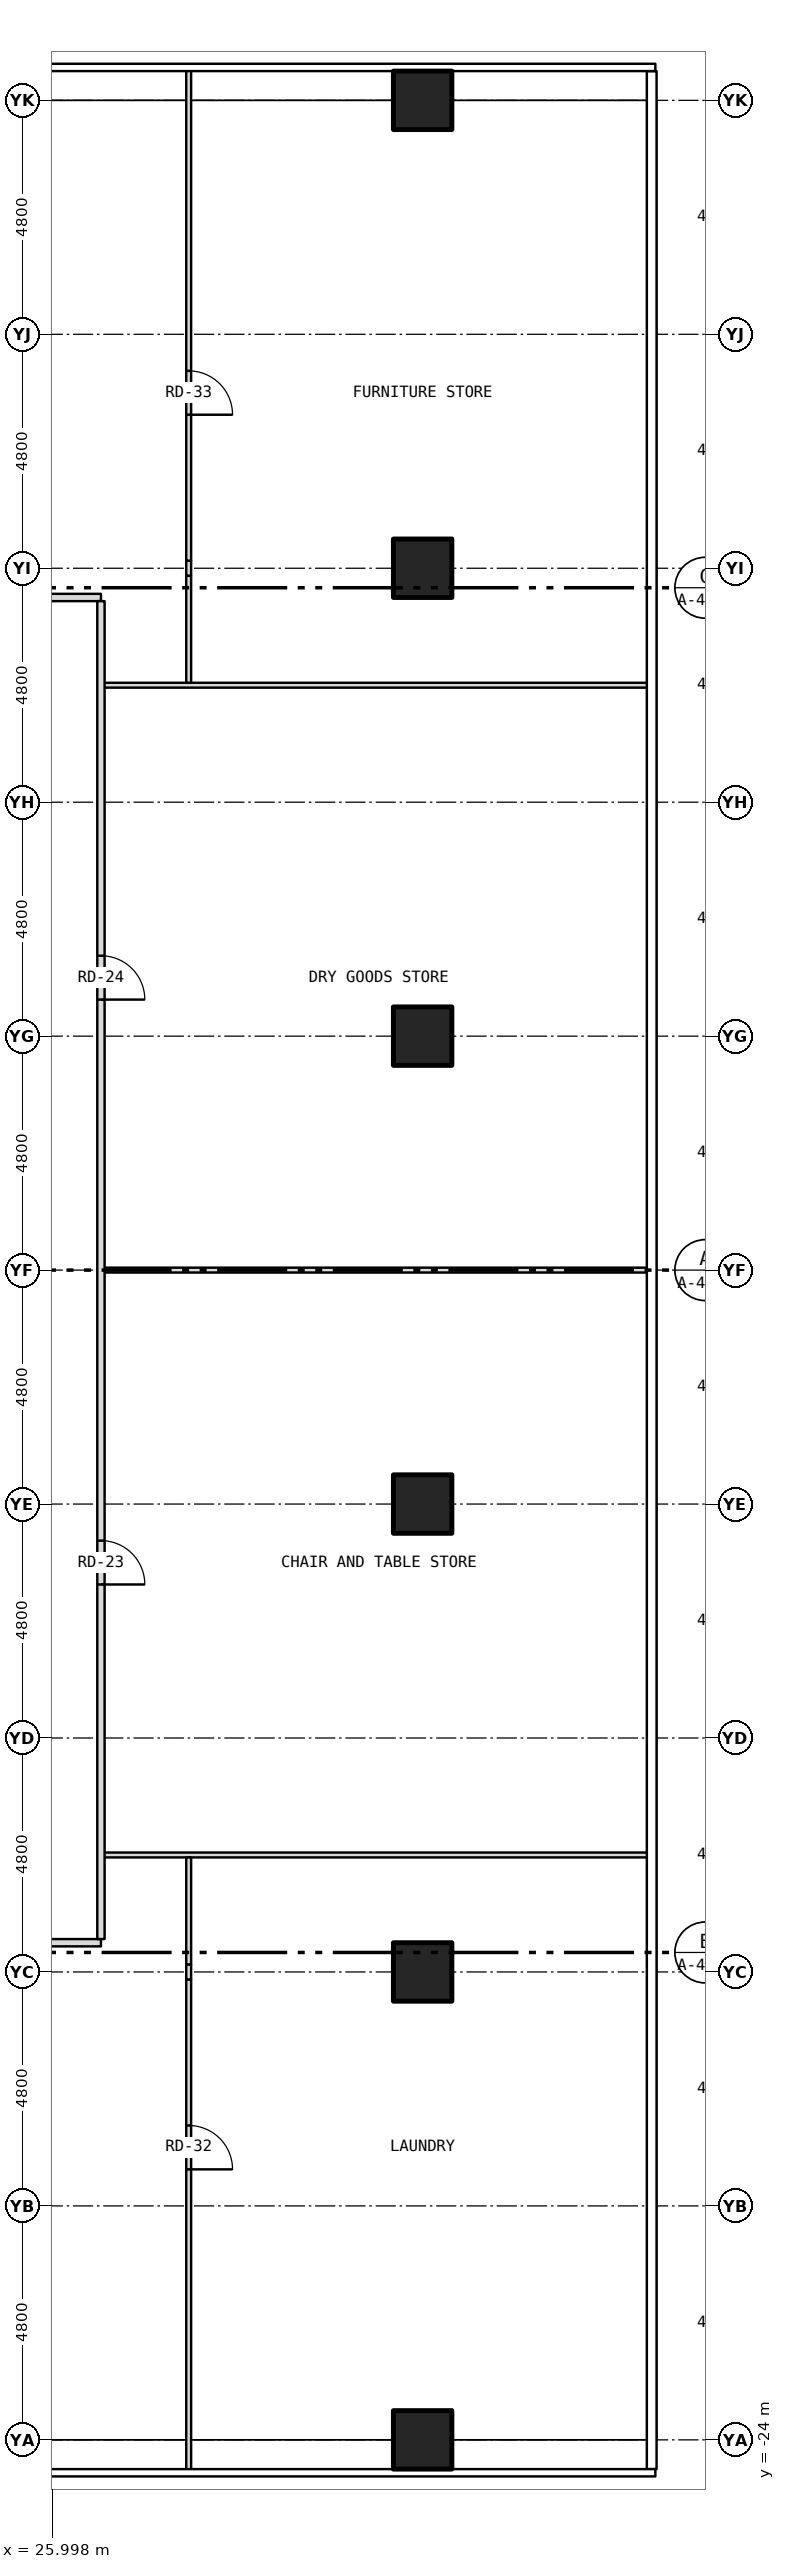
"""IFC4 building model, lengths in metres.
Left out: names, types, materials, properties, quantities, classifications, styles, units other than length and angle.
Written with IfcOpenShell. Run it as: python <this file> out.ifc"""

import sys

from ifc_helpers import new_model, si_unit, direction, frame, frame_2d, origin, origin_2d, place, context, subcontext, project, spatial, rectangle, hollow_rectangle, extrude, element, fill, save


model = new_model("IFC4")
c1 = context("Model", 3, precision=1e-05, world=origin(), true_north=direction((0.0, 1.0)))
c2 = subcontext(c1, "Body", "Model", "MODEL_VIEW")
j1 = project(units=[si_unit("LENGTHUNIT", "METRE"), si_unit("PLANEANGLEUNIT", "RADIAN")], contexts=[c1])
p1 = place(None, origin())
s1 = spatial("IfcSite", under=j1, at=p1, CompositionType="ELEMENT")
p2 = place(p1, origin())
s2 = spatial("IfcBuilding", under=s1, at=p2, CompositionType="ELEMENT")
p3 = place(p2, frame((0.0, 0.0, 7.5)))
s3 = spatial("IfcBuildingStorey", under=s2, at=p3, CompositionType="ELEMENT", Elevation=7.5)
for number, where, z_axis, x_axis in (
    (1, (33.6, -24.0, -0.25), (0.0, 0.0, 1.0), (1.0, 0.0, 0.0)),
    (2, (33.6, -14.4, -0.25), (0.0, 0.0, 1.0), (1.0, 0.0, 0.0)),
    (3, (33.6, -4.8, -0.25), (0.0, 0.0, 1.0), (1.0, 0.0, 0.0)),
    (4, (33.6, 4.8, -0.25), (0.0, 0.0, 1.0), (1.0, 0.0, 0.0)),
    (5, (33.6, 14.4, -0.25), (0.0, 0.0, 1.0), (1.0, 0.0, 0.0)),
    (6, (33.6, 24.0, -0.25), (0.0, 0.0, 1.0), (1.0, 0.0, 0.0)),
):
    element("IfcColumn", number, at=place(p3, frame(where, z_axis=z_axis, x_axis=x_axis)), inside=s3, PredefinedType="COLUMN", context=c2, shape_type="SweptSolid", body=[
        extrude(hollow_rectangle(XDim=1.2, YDim=1.2, WallThickness=0.07, at=origin_2d()), origin(), (0.0, 0.0, 1.0), 8.05),
    ])
p4 = place(p3, frame((-27.0, -13.8, 0.0), z_axis=(0.0, 0.0, 1.0), x_axis=(1.0, 0.0, 0.0)))
e7 = element("IfcWall", 7, at=p4, inside=s3, PredefinedType="PARTITIONING", context=c2, shape_type="SweptSolid", body=[
    extrude(rectangle(XDim=54.0, YDim=0.15, at=frame_2d((27.0, 0.0))), origin(), (0.0, 0.0, 1.0), 7.8),
])
p5 = place(p4, frame((9.03, 0.0, 0.0)))
e8 = element("IfcOpeningElement", 8, at=p5, cuts=e7, PredefinedType="OPENING", context=c2, shape_type="SweptSolid", body=[
    extrude(rectangle(XDim=0.9, YDim=2.1, at=frame_2d((0.45, 1.05))), frame((0.0, 0.087, 0.0), z_axis=(0.0, -1.0, 0.0), x_axis=(1.0, 0.0, 0.0)), (0.0, 0.0, 1.0), 0.174),
])
p6 = place(p4, frame((11.08, 0.0, 0.0)))
e9 = element("IfcOpeningElement", 9, at=p6, cuts=e7, PredefinedType="OPENING", context=c2, shape_type="SweptSolid", body=[
    extrude(rectangle(XDim=0.9, YDim=2.1, at=frame_2d((0.45, 1.05))), frame((0.0, 0.087, 0.0), z_axis=(0.0, -1.0, 0.0), x_axis=(1.0, 0.0, 0.0)), (0.0, 0.0, 1.0), 0.174),
])
p7 = place(p4, frame((19.891, 0.0, 0.0)))
e10 = element("IfcOpeningElement", 10, at=p7, cuts=e7, PredefinedType="OPENING", context=c2, shape_type="SweptSolid", body=[
    extrude(rectangle(XDim=0.9, YDim=2.1, at=frame_2d((0.45, 1.05))), frame((0.0, 0.087, 0.0), z_axis=(0.0, -1.0, 0.0), x_axis=(1.0, 0.0, 0.0)), (0.0, 0.0, 1.0), 0.174),
])
p8 = place(p4, frame((30.274, 0.0, 0.0)))
e11 = element("IfcOpeningElement", 11, at=p8, cuts=e7, PredefinedType="OPENING", context=c2, shape_type="SweptSolid", body=[
    extrude(rectangle(XDim=0.9, YDim=2.1, at=frame_2d((0.45, 1.05))), frame((0.0, 0.087, 0.0), z_axis=(0.0, -1.0, 0.0), x_axis=(1.0, 0.0, 0.0)), (0.0, 0.0, 1.0), 0.174),
])
p9 = place(p4, frame((3.75, 0.0, 0.0)))
e12 = element("IfcOpeningElement", 12, at=p9, cuts=e7, PredefinedType="OPENING", context=c2, shape_type="SweptSolid", body=[
    extrude(rectangle(XDim=0.9, YDim=2.1, at=frame_2d((0.45, 1.05))), frame((0.0, 0.087, 0.0), z_axis=(0.0, -1.0, 0.0), x_axis=(1.0, 0.0, 0.0)), (0.0, 0.0, 1.0), 0.174),
])
p10 = place(p4, frame((49.35, 0.0, 0.0)))
e13 = element("IfcOpeningElement", 13, at=p10, cuts=e7, PredefinedType="OPENING", context=c2, shape_type="SweptSolid", body=[
    extrude(rectangle(XDim=0.9, YDim=2.1, at=frame_2d((0.45, 1.05))), frame((0.0, 0.087, 0.0), z_axis=(0.0, -1.0, 0.0), x_axis=(1.0, 0.0, 0.0)), (0.0, 0.0, 1.0), 0.174),
])
p11 = place(p4, frame((42.15, 0.0, 0.0)))
e14 = element("IfcOpeningElement", 14, at=p11, cuts=e7, PredefinedType="OPENING", context=c2, shape_type="SweptSolid", body=[
    extrude(rectangle(XDim=0.9, YDim=2.1, at=frame_2d((0.45, 1.05))), frame((0.0, 0.087, 0.0), z_axis=(0.0, -1.0, 0.0), x_axis=(1.0, 0.0, 0.0)), (0.0, 0.0, 1.0), 0.174),
])
p12 = place(p4, frame((15.239, 0.0, 0.0)))
e15 = element("IfcOpeningElement", 15, at=p12, cuts=e7, PredefinedType="OPENING", context=c2, shape_type="SweptSolid", body=[
    extrude(rectangle(XDim=0.9, YDim=2.1, at=frame_2d((0.45, 1.05))), frame((0.0, 0.087, 0.0), z_axis=(0.0, -1.0, 0.0), x_axis=(1.0, 0.0, 0.0)), (0.0, 0.0, 1.0), 0.174),
])
for number, where, z_axis, x_axis in (
    (16, (27.0, -12.0, 0.0), (0.0, 0.0, 1.0), (1.0, 0.0, 0.0)),
    (17, (27.0, 0.0, 0.0), (0.0, 0.0, 1.0), (1.0, 0.0, 0.0)),
    (18, (27.0, 12.0, 0.0), (0.0, 0.0, 1.0), (1.0, 0.0, 0.0)),
):
    element("IfcWall", number, at=place(p3, frame(where, z_axis=z_axis, x_axis=x_axis)), inside=s3, PredefinedType="PARTITIONING", context=c2, shape_type="SweptSolid", body=[
        extrude(rectangle(XDim=11.28, YDim=0.1, at=frame_2d((5.64, 0.0))), origin(), (0.0, 0.0, 1.0), 7.8),
    ])
p13 = place(p3, frame((-27.0, 13.8, 0.0), z_axis=(0.0, 0.0, 1.0), x_axis=(1.0, 0.0, 0.0)))
e19 = element("IfcWall", 19, at=p13, inside=s3, PredefinedType="PARTITIONING", context=c2, shape_type="SweptSolid", body=[
    extrude(rectangle(XDim=54.0, YDim=0.15, at=frame_2d((27.0, 0.0))), origin(), (0.0, 0.0, 1.0), 7.8),
])
p14 = place(p13, frame((13.35, 0.0, 0.0)))
e20 = element("IfcOpeningElement", 20, at=p14, cuts=e19, PredefinedType="OPENING", context=c2, shape_type="SweptSolid", body=[
    extrude(rectangle(XDim=0.9, YDim=2.1, at=frame_2d((0.45, 1.05))), frame((0.0, 0.087, 0.0), z_axis=(0.0, -1.0, 0.0), x_axis=(1.0, 0.0, 0.0)), (0.0, 0.0, 1.0), 0.174),
])
p15 = place(p13, frame((22.846, 0.0, 0.0)))
e21 = element("IfcOpeningElement", 21, at=p15, cuts=e19, PredefinedType="OPENING", context=c2, shape_type="SweptSolid", body=[
    extrude(rectangle(XDim=0.9, YDim=2.1, at=frame_2d((0.45, 1.05))), frame((0.0, 0.087, 0.0), z_axis=(0.0, -1.0, 0.0), x_axis=(1.0, 0.0, 0.0)), (0.0, 0.0, 1.0), 0.174),
])
p16 = place(p13, frame((28.756, 0.0, 0.0)))
e22 = element("IfcOpeningElement", 22, at=p16, cuts=e19, PredefinedType="OPENING", context=c2, shape_type="SweptSolid", body=[
    extrude(rectangle(XDim=0.9, YDim=2.1, at=frame_2d((0.45, 1.05))), frame((0.0, 0.087, 0.0), z_axis=(0.0, -1.0, 0.0), x_axis=(1.0, 0.0, 0.0)), (0.0, 0.0, 1.0), 0.174),
])
p17 = place(p13, frame((33.556, 0.0, 0.0)))
e23 = element("IfcOpeningElement", 23, at=p17, cuts=e19, PredefinedType="OPENING", context=c2, shape_type="SweptSolid", body=[
    extrude(rectangle(XDim=0.9, YDim=2.1, at=frame_2d((0.45, 1.05))), frame((0.0, 0.087, 0.0), z_axis=(0.0, -1.0, 0.0), x_axis=(1.0, 0.0, 0.0)), (0.0, 0.0, 1.0), 0.174),
])
p18 = place(p13, frame((42.768, 0.0, 0.0)))
e24 = element("IfcOpeningElement", 24, at=p18, cuts=e19, PredefinedType="OPENING", context=c2, shape_type="SweptSolid", body=[
    extrude(rectangle(XDim=0.9, YDim=2.1, at=frame_2d((0.45, 1.05))), frame((0.0, 0.087, 0.0), z_axis=(0.0, -1.0, 0.0), x_axis=(1.0, 0.0, 0.0)), (0.0, 0.0, 1.0), 0.174),
])
p19 = place(p13, frame((3.75, 0.0, 0.0)))
e25 = element("IfcOpeningElement", 25, at=p19, cuts=e19, PredefinedType="OPENING", context=c2, shape_type="SweptSolid", body=[
    extrude(rectangle(XDim=0.9, YDim=2.1, at=frame_2d((0.45, 1.05))), frame((0.0, 0.087, 0.0), z_axis=(0.0, -1.0, 0.0), x_axis=(1.0, 0.0, 0.0)), (0.0, 0.0, 1.0), 0.174),
])
p20 = place(p13, frame((49.35, 0.0, 0.0)))
e26 = element("IfcOpeningElement", 26, at=p20, cuts=e19, PredefinedType="OPENING", context=c2, shape_type="SweptSolid", body=[
    extrude(rectangle(XDim=0.9, YDim=2.1, at=frame_2d((0.45, 1.05))), frame((0.0, 0.087, 0.0), z_axis=(0.0, -1.0, 0.0), x_axis=(1.0, 0.0, 0.0)), (0.0, 0.0, 1.0), 0.174),
])
p21 = place(p13, frame((25.283, 0.0, 0.0)))
e27 = element("IfcOpeningElement", 27, at=p21, cuts=e19, PredefinedType="OPENING", context=c2, shape_type="SweptSolid", body=[
    extrude(rectangle(XDim=0.9, YDim=2.1, at=frame_2d((0.45, 1.05))), frame((0.0, 0.087, 0.0), z_axis=(0.0, -1.0, 0.0), x_axis=(1.0, 0.0, 0.0)), (0.0, 0.0, 1.0), 0.174),
])
p22 = place(p3, frame((27.0, -13.725, 0.0), z_axis=(0.0, 0.0, 1.0), x_axis=(0.0, 1.0, 0.0)))
e28 = element("IfcWall", 28, at=p22, inside=s3, PredefinedType="PARTITIONING", context=c2, shape_type="SweptSolid", body=[
    extrude(rectangle(XDim=27.45, YDim=0.15, at=frame_2d((13.725, 0.0))), origin(), (0.0, 0.0, 1.0), 7.8),
])
p23 = place(p22, frame((7.275, 0.0, 0.0)))
e29 = element("IfcOpeningElement", 29, at=p23, cuts=e28, PredefinedType="OPENING", context=c2, shape_type="SweptSolid", body=[
    extrude(rectangle(XDim=0.9, YDim=2.1, at=frame_2d((0.45, 1.05))), frame((0.0, 0.087, 0.0), z_axis=(0.0, -1.0, 0.0), x_axis=(1.0, 0.0, 0.0)), (0.0, 0.0, 1.0), 0.174),
])
p24 = place(p22, frame((19.275, 0.0, 0.0)))
e30 = element("IfcOpeningElement", 30, at=p24, cuts=e28, PredefinedType="OPENING", context=c2, shape_type="SweptSolid", body=[
    extrude(rectangle(XDim=0.9, YDim=2.1, at=frame_2d((0.45, 1.05))), frame((0.0, 0.087, 0.0), z_axis=(0.0, -1.0, 0.0), x_axis=(1.0, 0.0, 0.0)), (0.0, 0.0, 1.0), 0.174),
])
p25 = place(p3, frame((28.8, -24.63, 0.0), z_axis=(0.0, 0.0, 1.0), x_axis=(0.0, 1.0, 0.0)))
e31 = element("IfcWall", 31, at=p25, inside=s3, PredefinedType="PARTITIONING", context=c2, shape_type="SweptSolid", body=[
    extrude(rectangle(XDim=10.076, YDim=0.1, at=frame_2d((5.038, 0.0))), origin(), (0.0, 0.0, 1.0), 7.183),
])
p26 = place(p25, frame((6.18, 0.0, 0.0)))
e32 = element("IfcOpeningElement", 32, at=p26, cuts=e31, PredefinedType="OPENING", context=c2, shape_type="SweptSolid", body=[
    extrude(rectangle(XDim=0.9, YDim=2.1, at=frame_2d((0.45, 1.05))), frame((0.0, 0.062, 0.0), z_axis=(0.0, -1.0, 0.0), x_axis=(1.0, 0.0, 0.0)), (0.0, 0.0, 1.0), 0.124),
])
p27 = place(p3, frame((28.8, -14.554, 0.0), z_axis=(0.0, 0.0, 1.0), x_axis=(0.0, 1.0, 0.0)))
e33 = element("IfcWall", 33, at=p27, inside=s3, PredefinedType="PARTITIONING", context=c2, shape_type="SweptSolid", body=[
    extrude(rectangle(XDim=0.308, YDim=0.1, at=frame_2d((0.154, 0.0))), origin(), (0.0, 0.0, 1.0), 7.8),
])
for number, where, z_axis, x_axis in (
    (34, (28.8, -14.246, 0.0), (0.0, 0.0, 1.0), (0.0, 1.0, 0.0)),
    (35, (28.8, 12.05, 0.0), (0.0, 0.0, 1.0), (0.0, 1.0, 0.0)),
):
    element("IfcWall", number, at=place(p3, frame(where, z_axis=z_axis, x_axis=x_axis)), inside=s3, PredefinedType="PARTITIONING", context=c2, shape_type="SweptSolid", body=[
        extrude(rectangle(XDim=2.196, YDim=0.1, at=frame_2d((1.098, 0.0))), origin(), (0.0, 0.0, 1.0), 7.183),
    ])
p28 = place(p3, frame((28.8, 14.246, 0.0), z_axis=(0.0, 0.0, 1.0), x_axis=(0.0, 1.0, 0.0)))
e36 = element("IfcWall", 36, at=p28, inside=s3, PredefinedType="PARTITIONING", context=c2, shape_type="SweptSolid", body=[
    extrude(rectangle(XDim=0.308, YDim=0.1, at=frame_2d((0.154, 0.0))), origin(), (0.0, 0.0, 1.0), 7.8),
])
p29 = place(p3, frame((28.8, 14.554, 0.0), z_axis=(0.0, 0.0, 1.0), x_axis=(0.0, 1.0, 0.0)))
e37 = element("IfcWall", 37, at=p29, inside=s3, PredefinedType="PARTITIONING", context=c2, shape_type="SweptSolid", body=[
    extrude(rectangle(XDim=10.076, YDim=0.1, at=frame_2d((5.038, 0.0))), origin(), (0.0, 0.0, 1.0), 7.183),
])
p30 = place(p29, frame((2.996, 0.0, 0.0)))
e38 = element("IfcOpeningElement", 38, at=p30, cuts=e37, PredefinedType="OPENING", context=c2, shape_type="SweptSolid", body=[
    extrude(rectangle(XDim=0.9, YDim=2.1, at=frame_2d((0.45, 1.05))), frame((0.0, 0.062, 0.0), z_axis=(0.0, -1.0, 0.0), x_axis=(1.0, 0.0, 0.0)), (0.0, 0.0, 1.0), 0.124),
])
p31 = place(p23, origin())
e39 = element("IfcDoor", 39, at=p31, inside=s3, OperationType="SINGLE_SWING_LEFT", PredefinedType="DOOR", context=c2, shape_type="SweptSolid", body=[
    extrude(rectangle(XDim=0.9, YDim=2.1, at=frame_2d((0.45, 1.05))), frame((0.0, 0.025, 0.0), z_axis=(0.0, -1.0, 0.0), x_axis=(1.0, 0.0, 0.0)), (0.0, 0.0, 1.0), 0.05),
])
fill(e29, e39)
p32 = place(p24, origin())
e40 = element("IfcDoor", 40, at=p32, inside=s3, OperationType="SINGLE_SWING_LEFT", PredefinedType="DOOR", context=c2, shape_type="SweptSolid", body=[
    extrude(rectangle(XDim=0.9, YDim=2.1, at=frame_2d((0.45, 1.05))), frame((0.0, 0.025, 0.0), z_axis=(0.0, -1.0, 0.0), x_axis=(1.0, 0.0, 0.0)), (0.0, 0.0, 1.0), 0.05),
])
fill(e30, e40)
p33 = place(p26, origin())
e41 = element("IfcDoor", 41, at=p33, inside=s3, OperationType="SINGLE_SWING_LEFT", PredefinedType="DOOR", context=c2, shape_type="SweptSolid", body=[
    extrude(rectangle(XDim=0.9, YDim=2.1, at=frame_2d((0.45, 1.05))), frame((0.0, 0.025, 0.0), z_axis=(0.0, -1.0, 0.0), x_axis=(1.0, 0.0, 0.0)), (0.0, 0.0, 1.0), 0.05),
])
fill(e32, e41)
p34 = place(p30, origin())
e42 = element("IfcDoor", 42, at=p34, inside=s3, OperationType="SINGLE_SWING_LEFT", PredefinedType="DOOR", context=c2, shape_type="SweptSolid", body=[
    extrude(rectangle(XDim=0.9, YDim=2.1, at=frame_2d((0.45, 1.05))), frame((0.0, 0.025, 0.0), z_axis=(0.0, -1.0, 0.0), x_axis=(1.0, 0.0, 0.0)), (0.0, 0.0, 1.0), 0.05),
])
fill(e38, e42)
save(model, sys.argv[1])
